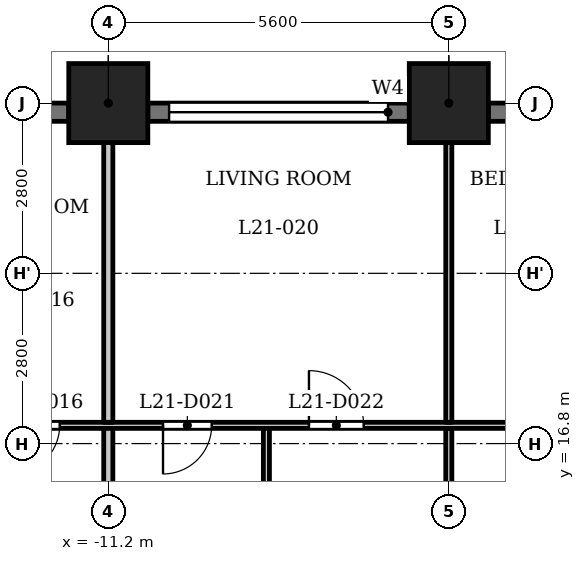
"""IFC4 building model, lengths in metres.
Left out: names, types, materials, properties, quantities, classifications, styles, units other than length and angle.
Written with IfcOpenShell. Run it as: python <this file> out.ifc"""

import sys

from ifc_helpers import new_model, si_unit, direction, frame, frame_2d, origin, origin_2d, place, context, subcontext, project, spatial, rectangle, extrude, element, fill, save


model = new_model("IFC4")
c1 = context("Model", 3, precision=1e-05, world=origin(), true_north=direction((0.0, 1.0)))
c2 = subcontext(c1, "Body", "Model", "MODEL_VIEW")
j1 = project(units=[si_unit("LENGTHUNIT", "METRE"), si_unit("PLANEANGLEUNIT", "RADIAN")], contexts=[c1])
p1 = place(None, origin())
s1 = spatial("IfcSite", under=j1, at=p1, CompositionType="ELEMENT")
p2 = place(p1, origin())
s2 = spatial("IfcBuilding", under=s1, at=p2, CompositionType="ELEMENT")
p3 = place(p2, frame((0.0, 0.0, 86.8)))
s3 = spatial("IfcBuildingStorey", under=s2, at=p3, CompositionType="ELEMENT", Elevation=86.8)
for number, where, z_axis, x_axis in (
    (1, (-5.6, 22.4, 0.0), (0.0, 0.0, 1.0), (1.0, 0.0, 0.0)),
    (2, (-11.2, 22.4, 0.0), (0.0, 0.0, 1.0), (1.0, 0.0, 0.0)),
):
    element("IfcColumn", number, at=place(p3, frame(where, z_axis=z_axis, x_axis=x_axis)), inside=s3, PredefinedType="COLUMN", context=c2, shape_type="SweptSolid", body=[
        extrude(rectangle(XDim=1.3, YDim=1.3, at=origin_2d()), origin(), (0.0, 0.0, 1.0), 3.5),
    ])
p4 = place(p3, frame((-0.65, 22.25, 0.0), z_axis=(0.0, 0.0, 1.0), x_axis=(-1.0, 0.0, 0.0)))
e3 = element("IfcWall", 3, at=p4, inside=s3, PredefinedType="SOLIDWALL", context=c2, shape_type="SweptSolid", body=[
    extrude(rectangle(XDim=4.3, YDim=0.3, at=frame_2d((2.15, 0.0))), origin(), (0.0, 0.0, 1.0), 2.4),
])
p5 = place(p4, frame((0.438, 0.0, 0.6)))
e4 = element("IfcOpeningElement", 4, at=p5, cuts=e3, PredefinedType="OPENING", context=c2, shape_type="SweptSolid", body=[
    extrude(rectangle(XDim=1.2, YDim=1.55, at=frame_2d((0.6, 0.775))), frame((0.0, 0.16, 0.0), z_axis=(0.0, -1.0, 0.0), x_axis=(1.0, 0.0, 0.0)), (0.0, 0.0, 1.0), 0.32),
])
p6 = place(p4, frame((2.663, 0.0, 0.6)))
e5 = element("IfcOpeningElement", 5, at=p6, cuts=e3, PredefinedType="OPENING", context=c2, shape_type="SweptSolid", body=[
    extrude(rectangle(XDim=1.2, YDim=1.55, at=frame_2d((0.6, 0.775))), frame((0.0, 0.16, 0.0), z_axis=(0.0, -1.0, 0.0), x_axis=(1.0, 0.0, 0.0)), (0.0, 0.0, 1.0), 0.32),
])
p7 = place(p3, frame((-6.25, 22.25, 0.0), z_axis=(0.0, 0.0, 1.0), x_axis=(-1.0, 0.0, 0.0)))
e6 = element("IfcWall", 6, at=p7, inside=s3, PredefinedType="SOLIDWALL", context=c2, shape_type="SweptSolid", body=[
    extrude(rectangle(XDim=4.3, YDim=0.3, at=frame_2d((2.15, 0.0))), origin(), (0.0, 0.0, 1.0), 2.4),
])
p8 = place(p7, frame((0.35, 0.0, 1.2)))
e7 = element("IfcOpeningElement", 7, at=p8, cuts=e6, PredefinedType="OPENING", context=c2, shape_type="SweptSolid", body=[
    extrude(rectangle(XDim=3.6, YDim=0.95, at=frame_2d((1.8, 0.475))), frame((0.0, 0.16, 0.0), z_axis=(0.0, -1.0, 0.0), x_axis=(1.0, 0.0, 0.0)), (0.0, 0.0, 1.0), 0.32),
])
p9 = place(p3, frame((-11.85, 22.25, 0.0), z_axis=(0.0, 0.0, 1.0), x_axis=(-1.0, 0.0, 0.0)))
e8 = element("IfcWall", 8, at=p9, inside=s3, PredefinedType="SOLIDWALL", context=c2, shape_type="SweptSolid", body=[
    extrude(rectangle(XDim=4.3, YDim=0.3, at=frame_2d((2.15, 0.0))), origin(), (0.0, 0.0, 1.0), 2.4),
])
p10 = place(p9, frame((0.538, 0.0, 0.6)))
e9 = element("IfcOpeningElement", 9, at=p10, cuts=e8, PredefinedType="OPENING", context=c2, shape_type="SweptSolid", body=[
    extrude(rectangle(XDim=1.2, YDim=1.55, at=frame_2d((0.6, 0.775))), frame((0.0, 0.16, 0.0), z_axis=(0.0, -1.0, 0.0), x_axis=(1.0, 0.0, 0.0)), (0.0, 0.0, 1.0), 0.32),
])
p11 = place(p9, frame((2.762, 0.0, 0.6)))
e10 = element("IfcOpeningElement", 10, at=p11, cuts=e8, PredefinedType="OPENING", context=c2, shape_type="SweptSolid", body=[
    extrude(rectangle(XDim=1.2, YDim=1.55, at=frame_2d((0.6, 0.775))), frame((0.0, 0.16, 0.0), z_axis=(0.0, -1.0, 0.0), x_axis=(1.0, 0.0, 0.0)), (0.0, 0.0, 1.0), 0.32),
])
p12 = place(p3, frame((-16.725, 17.1, 0.0), z_axis=(0.0, 0.0, 1.0), x_axis=(1.0, 0.0, 0.0)))
e11 = element("IfcWall", 11, at=p12, inside=s3, PredefinedType="PARTITIONING", context=c2, shape_type="SweptSolid", body=[
    extrude(rectangle(XDim=33.45, YDim=0.1, at=frame_2d((16.725, 0.0))), origin(), (0.0, 0.0, 1.0), 3.2),
])
p13 = place(p12, frame((3.925, 0.0, 0.0)))
e12 = element("IfcOpeningElement", 12, at=p13, cuts=e11, PredefinedType="OPENING", context=c2, shape_type="SweptSolid", body=[
    extrude(rectangle(XDim=0.8, YDim=2.1, at=frame_2d((0.4, 1.05))), frame((0.0, 0.06, 0.0), z_axis=(0.0, -1.0, 0.0), x_axis=(1.0, 0.0, 0.0)), (0.0, 0.0, 1.0), 0.12),
])
p14 = place(p12, frame((0.975, 0.0, 0.0)))
e13 = element("IfcOpeningElement", 13, at=p14, cuts=e11, PredefinedType="OPENING", context=c2, shape_type="SweptSolid", body=[
    extrude(rectangle(XDim=0.9, YDim=2.1, at=frame_2d((0.45, 1.05))), frame((0.0, 0.06, 0.0), z_axis=(0.0, -1.0, 0.0), x_axis=(1.0, 0.0, 0.0)), (0.0, 0.0, 1.0), 0.12),
])
p15 = place(p12, frame((6.425, 0.0, 0.0)))
e14 = element("IfcOpeningElement", 14, at=p15, cuts=e11, PredefinedType="OPENING", context=c2, shape_type="SweptSolid", body=[
    extrude(rectangle(XDim=0.8, YDim=2.1, at=frame_2d((0.4, 1.05))), frame((0.0, 0.06, 0.0), z_axis=(0.0, -1.0, 0.0), x_axis=(1.0, 0.0, 0.0)), (0.0, 0.0, 1.0), 0.12),
])
p16 = place(p12, frame((8.825, 0.0, 0.0)))
e15 = element("IfcOpeningElement", 15, at=p16, cuts=e11, PredefinedType="OPENING", context=c2, shape_type="SweptSolid", body=[
    extrude(rectangle(XDim=0.9, YDim=2.1, at=frame_2d((0.45, 1.05))), frame((0.0, 0.06, 0.0), z_axis=(0.0, -1.0, 0.0), x_axis=(1.0, 0.0, 0.0)), (0.0, 0.0, 1.0), 0.12),
])
p17 = place(p12, frame((12.375, 0.0, 0.0)))
e16 = element("IfcOpeningElement", 16, at=p17, cuts=e11, PredefinedType="OPENING", context=c2, shape_type="SweptSolid", body=[
    extrude(rectangle(XDim=0.9, YDim=2.1, at=frame_2d((0.45, 1.05))), frame((0.0, 0.06, 0.0), z_axis=(0.0, -1.0, 0.0), x_axis=(1.0, 0.0, 0.0)), (0.0, 0.0, 1.0), 0.12),
])
p18 = place(p12, frame((14.425, 0.0, 0.0)))
e17 = element("IfcOpeningElement", 17, at=p18, cuts=e11, PredefinedType="OPENING", context=c2, shape_type="SweptSolid", body=[
    extrude(rectangle(XDim=0.9, YDim=2.1, at=frame_2d((0.45, 1.05))), frame((0.0, 0.06, 0.0), z_axis=(0.0, -1.0, 0.0), x_axis=(1.0, 0.0, 0.0)), (0.0, 0.0, 1.0), 0.12),
])
p19 = place(p12, frame((26.225, 0.0, 0.0)))
e18 = element("IfcOpeningElement", 18, at=p19, cuts=e11, PredefinedType="OPENING", context=c2, shape_type="SweptSolid", body=[
    extrude(rectangle(XDim=0.8, YDim=2.1, at=frame_2d((0.4, 1.05))), frame((0.0, 0.06, 0.0), z_axis=(0.0, -1.0, 0.0), x_axis=(1.0, 0.0, 0.0)), (0.0, 0.0, 1.0), 0.12),
])
p20 = place(p12, frame((23.025, 0.0, 0.0)))
e19 = element("IfcOpeningElement", 19, at=p20, cuts=e11, PredefinedType="OPENING", context=c2, shape_type="SweptSolid", body=[
    extrude(rectangle(XDim=0.9, YDim=2.1, at=frame_2d((0.45, 1.05))), frame((0.0, 0.06, 0.0), z_axis=(0.0, -1.0, 0.0), x_axis=(1.0, 0.0, 0.0)), (0.0, 0.0, 1.0), 0.12),
])
p21 = place(p12, frame((17.775, 0.0, 0.0)))
e20 = element("IfcOpeningElement", 20, at=p21, cuts=e11, PredefinedType="OPENING", context=c2, shape_type="SweptSolid", body=[
    extrude(rectangle(XDim=0.9, YDim=2.1, at=frame_2d((0.45, 1.05))), frame((0.0, 0.06, 0.0), z_axis=(0.0, -1.0, 0.0), x_axis=(1.0, 0.0, 0.0)), (0.0, 0.0, 1.0), 0.12),
])
p22 = place(p12, frame((20.025, 0.0, 0.0)))
e21 = element("IfcOpeningElement", 21, at=p22, cuts=e11, PredefinedType="OPENING", context=c2, shape_type="SweptSolid", body=[
    extrude(rectangle(XDim=0.9, YDim=2.1, at=frame_2d((0.45, 1.05))), frame((0.0, 0.06, 0.0), z_axis=(0.0, -1.0, 0.0), x_axis=(1.0, 0.0, 0.0)), (0.0, 0.0, 1.0), 0.12),
])
p23 = place(p12, frame((28.825, 0.0, 0.0)))
e22 = element("IfcOpeningElement", 22, at=p23, cuts=e11, PredefinedType="OPENING", context=c2, shape_type="SweptSolid", body=[
    extrude(rectangle(XDim=0.8, YDim=2.1, at=frame_2d((0.4, 1.05))), frame((0.0, 0.06, 0.0), z_axis=(0.0, -1.0, 0.0), x_axis=(1.0, 0.0, 0.0)), (0.0, 0.0, 1.0), 0.12),
])
p24 = place(p12, frame((31.975, 0.0, 0.0)))
e23 = element("IfcOpeningElement", 23, at=p24, cuts=e11, PredefinedType="OPENING", context=c2, shape_type="SweptSolid", body=[
    extrude(rectangle(XDim=0.9, YDim=2.1, at=frame_2d((0.45, 1.05))), frame((0.0, 0.06, 0.0), z_axis=(0.0, -1.0, 0.0), x_axis=(1.0, 0.0, 0.0)), (0.0, 0.0, 1.0), 0.12),
])
p25 = place(p3, frame((-11.2, 13.275, 0.0), z_axis=(0.0, 0.0, 1.0), x_axis=(0.0, 1.0, 0.0)))
e24 = element("IfcWall", 24, at=p25, inside=s3, PredefinedType="PARTITIONING", context=c2, shape_type="SweptSolid", body=[
    extrude(rectangle(XDim=3.775, YDim=0.15, at=frame_2d((1.888, 0.0))), origin(), (0.0, 0.0, 1.0), 3.2),
])
p26 = place(p3, frame((-11.2, 17.15, 0.0), z_axis=(0.0, 0.0, 1.0), x_axis=(0.0, 1.0, 0.0)))
e25 = element("IfcWall", 25, at=p26, inside=s3, PredefinedType="PARTITIONING", context=c2, shape_type="SweptSolid", body=[
    extrude(rectangle(XDim=5.88, YDim=0.15, at=frame_2d((2.94, 0.0))), origin(), (0.0, 0.0, 1.0), 3.2),
])
p27 = place(p3, frame((-8.6, 13.275, 0.0), z_axis=(0.0, 0.0, 1.0), x_axis=(0.0, 1.0, 0.0)))
e26 = element("IfcWall", 26, at=p27, inside=s3, PredefinedType="PARTITIONING", context=c2, shape_type="SweptSolid", body=[
    extrude(rectangle(XDim=3.775, YDim=0.1, at=frame_2d((1.888, 0.0))), origin(), (0.0, 0.0, 1.0), 3.2),
])
p28 = place(p3, frame((-5.6, 13.275, 0.0), z_axis=(0.0, 0.0, 1.0), x_axis=(0.0, 1.0, 0.0)))
e27 = element("IfcWall", 27, at=p28, inside=s3, PredefinedType="PARTITIONING", context=c2, shape_type="SweptSolid", body=[
    extrude(rectangle(XDim=3.775, YDim=0.1, at=frame_2d((1.888, 0.0))), origin(), (0.0, 0.0, 1.0), 3.2),
])
p29 = place(p28, frame((0.525, 0.0, 0.0)))
e28 = element("IfcOpeningElement", 28, at=p29, cuts=e27, PredefinedType="OPENING", context=c2, shape_type="SweptSolid", body=[
    extrude(rectangle(XDim=0.9, YDim=2.1, at=frame_2d((0.45, 1.05))), frame((0.0, 0.06, 0.0), z_axis=(0.0, -1.0, 0.0), x_axis=(1.0, 0.0, 0.0)), (0.0, 0.0, 1.0), 0.12),
])
p30 = place(p3, frame((-5.6, 17.15, 0.0), z_axis=(0.0, 0.0, 1.0), x_axis=(0.0, 1.0, 0.0)))
e29 = element("IfcWall", 29, at=p30, inside=s3, PredefinedType="PARTITIONING", context=c2, shape_type="SweptSolid", body=[
    extrude(rectangle(XDim=5.88, YDim=0.1, at=frame_2d((2.94, 0.0))), origin(), (0.0, 0.0, 1.0), 3.2),
])
p31 = place(p13, origin())
e30 = element("IfcDoor", 30, at=p31, inside=s3, OperationType="SINGLE_SWING_LEFT", PredefinedType="DOOR", context=c2, shape_type="SweptSolid", body=[
    extrude(rectangle(XDim=0.8, YDim=2.1, at=frame_2d((0.4, 1.05))), frame((0.0, 0.025, 0.0), z_axis=(0.0, -1.0, 0.0), x_axis=(1.0, 0.0, 0.0)), (0.0, 0.0, 1.0), 0.05),
])
fill(e12, e30)
p32 = place(p15, origin())
e31 = element("IfcDoor", 31, at=p32, inside=s3, OperationType="SINGLE_SWING_LEFT", PredefinedType="DOOR", context=c2, shape_type="SweptSolid", body=[
    extrude(rectangle(XDim=0.8, YDim=2.1, at=frame_2d((0.4, 1.05))), frame((0.0, 0.025, 0.0), z_axis=(0.0, -1.0, 0.0), x_axis=(1.0, 0.0, 0.0)), (0.0, 0.0, 1.0), 0.05),
])
fill(e14, e31)
p33 = place(p16, origin())
e32 = element("IfcDoor", 32, at=p33, inside=s3, OperationType="SINGLE_SWING_RIGHT", PredefinedType="DOOR", context=c2, shape_type="SweptSolid", body=[
    extrude(rectangle(XDim=0.9, YDim=2.1, at=frame_2d((0.45, 1.05))), frame((0.0, 0.025, 0.0), z_axis=(0.0, -1.0, 0.0), x_axis=(1.0, 0.0, 0.0)), (0.0, 0.0, 1.0), 0.05),
])
fill(e15, e32)
p34 = place(p8, origin())
e33 = element("IfcWindow", 33, at=p34, inside=s3, PartitioningType="SINGLE_PANEL", PredefinedType="WINDOW", context=c2, shape_type="SweptSolid", body=[
    extrude(rectangle(XDim=3.6, YDim=0.95, at=frame_2d((1.8, 0.475))), frame((0.0, 0.03, 0.0), z_axis=(0.0, -1.0, 0.0), x_axis=(1.0, 0.0, 0.0)), (0.0, 0.0, 1.0), 0.06),
])
fill(e7, e33)
save(model, sys.argv[1])
